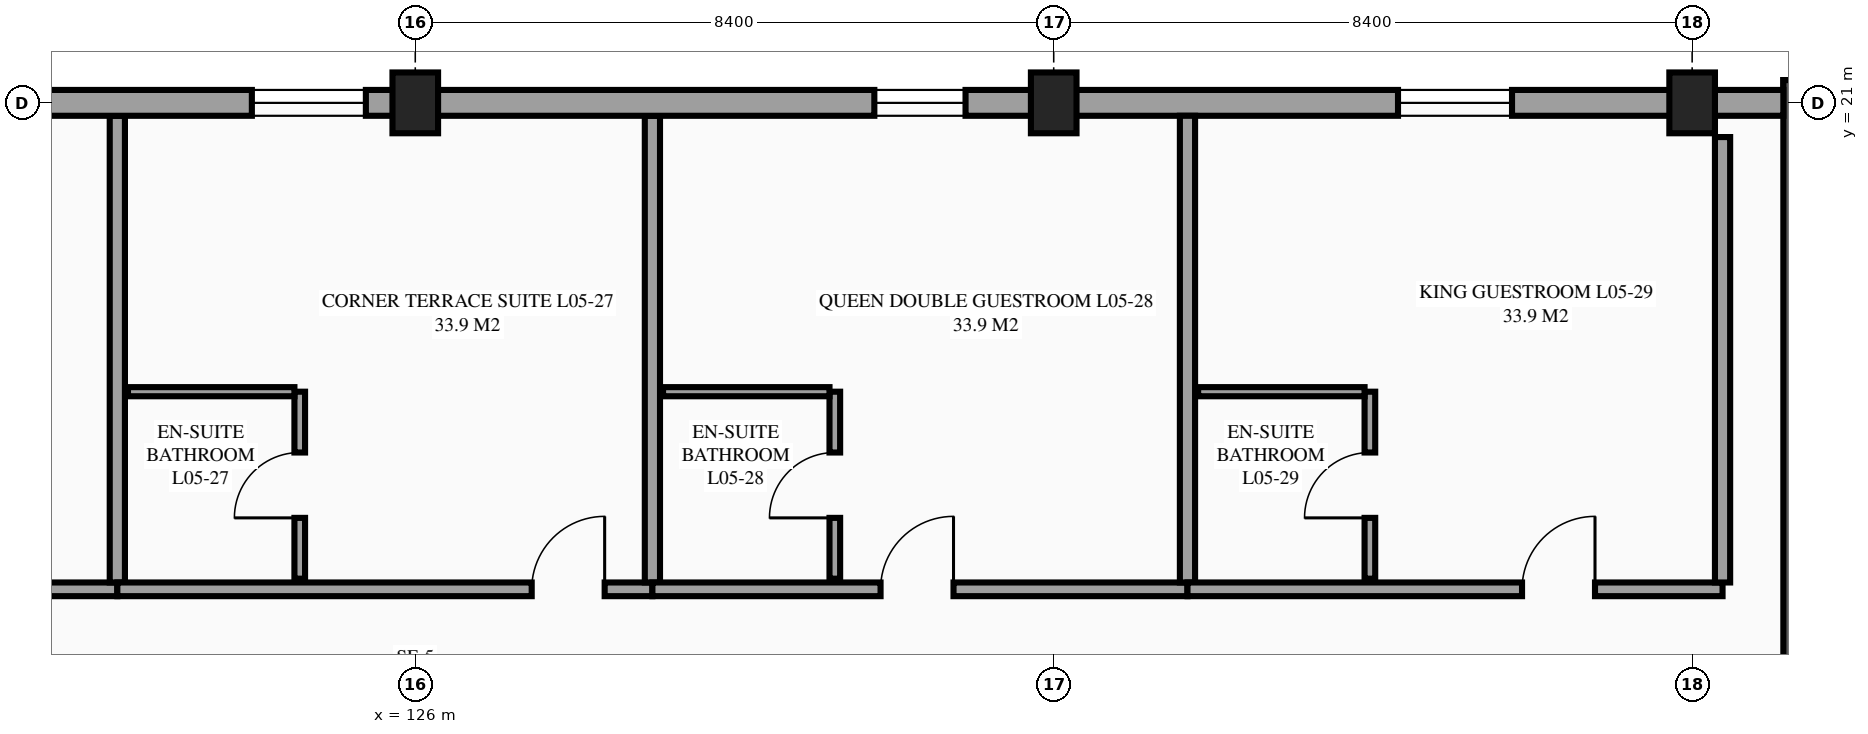
"""IFC4 building model, lengths in metres.
Left out: names, types, materials, properties, quantities, classifications, styles, units other than length and angle.
Written with IfcOpenShell. Run it as: python <this file> out.ifc"""

import sys

from ifc_helpers import new_model, si_unit, direction, frame, frame_2d, origin, origin_2d, place, context, subcontext, project, spatial, rectangle, extrude, element, fill, save


model = new_model("IFC4")
c1 = context("Model", 3, precision=1e-05, world=origin(), true_north=direction((0.0, 1.0)))
c2 = subcontext(c1, "Body", "Model", "MODEL_VIEW")
j1 = project(units=[si_unit("LENGTHUNIT", "METRE"), si_unit("PLANEANGLEUNIT", "RADIAN")], contexts=[c1])
p1 = place(None, origin())
s1 = spatial("IfcSite", under=j1, at=p1, CompositionType="ELEMENT")
p2 = place(p1, origin())
s2 = spatial("IfcBuilding", under=s1, at=p2, CompositionType="ELEMENT")
p3 = place(p2, frame((0.0, 0.0, 21.9)))
s3 = spatial("IfcBuildingStorey", under=s2, at=p3, CompositionType="ELEMENT", Elevation=21.9)
for number, where, z_axis, x_axis in (
    (1, (126.0, 21.0, 0.0), (0.0, 0.0, 1.0), (1.0, 0.0, 0.0)),
    (2, (134.4, 21.0, 0.0), (0.0, 0.0, 1.0), (1.0, 0.0, 0.0)),
    (3, (142.8, 21.0, 0.0), (0.0, 0.0, 1.0), (1.0, 0.0, 0.0)),
):
    element("IfcColumn", number, at=place(p3, frame(where, z_axis=z_axis, x_axis=x_axis)), inside=s3, PredefinedType="COLUMN", context=c2, shape_type="SweptSolid", body=[
        extrude(rectangle(XDim=0.6, YDim=0.8, at=origin_2d()), origin(), (0.0, 0.0, 1.0), 3.6),
    ])
p4 = place(p3, frame((142.8, 21.0, 0.0), z_axis=(0.0, 0.0, 1.0), x_axis=(-1.0, 0.0, 0.0)))
e4 = element("IfcWall", 4, at=p4, inside=s3, PredefinedType="STANDARD", context=c2, shape_type="SweptSolid", body=[
    extrude(rectangle(XDim=8.4, YDim=0.34, at=frame_2d((4.2, 0.0))), origin(), (0.0, 0.0, 1.0), 3.07),
])
p5 = place(p4, frame((2.37, 0.0, 0.85)))
e5 = element("IfcOpeningElement", 5, at=p5, cuts=e4, PredefinedType="OPENING", context=c2, shape_type="SweptSolid", body=[
    extrude(rectangle(XDim=1.5, YDim=1.5, at=frame_2d((0.75, 0.75))), frame((0.0, 0.18, 0.0), z_axis=(0.0, -1.0, 0.0), x_axis=(1.0, 0.0, 0.0)), (0.0, 0.0, 1.0), 0.36),
])
p6 = place(p3, frame((149.2, 21.15, 0.0), z_axis=(0.0, 0.0, 1.0), x_axis=(-1.0, 0.0, 0.0)))
e6 = element("IfcWall", 6, at=p6, inside=s3, PredefinedType="SHEAR", context=c2, shape_type="SweptSolid", body=[
    extrude(rectangle(XDim=5.2, YDim=0.3, at=frame_2d((2.6, 0.0))), origin(), (0.0, 0.0, 1.0), 3.6),
])
p7 = place(p3, frame((144.15, 21.3, 0.0), z_axis=(0.0, 0.0, 1.0), x_axis=(0.0, -1.0, 0.0)))
e7 = element("IfcWall", 7, at=p7, inside=s3, PredefinedType="SHEAR", context=c2, shape_type="SweptSolid", body=[
    extrude(rectangle(XDim=8.84, YDim=0.3, at=frame_2d((4.42, 0.0))), origin(), (0.0, 0.0, 1.0), 3.6),
])
p8 = place(p3, frame((115.04, 14.6, 0.0), z_axis=(0.0, 0.0, 1.0), x_axis=(1.0, 0.0, 0.0)))
e8 = element("IfcWall", 8, at=p8, inside=s3, PredefinedType="PARTITIONING", context=c2, shape_type="SweptSolid", body=[
    extrude(rectangle(XDim=7.04, YDim=0.18, at=frame_2d((3.52, 0.0))), origin(), (0.0, 0.0, 1.0), 3.375),
])
p9 = place(p8, frame((4.752, 0.0, 0.0)))
e9 = element("IfcOpeningElement", 9, at=p9, cuts=e8, PredefinedType="OPENING", context=c2, shape_type="SweptSolid", body=[
    extrude(rectangle(XDim=0.96, YDim=2.15, at=frame_2d((0.48, 1.075))), frame((0.0, 0.1, 0.0), z_axis=(0.0, -1.0, 0.0), x_axis=(1.0, 0.0, 0.0)), (0.0, 0.0, 1.0), 0.2),
])
p10 = place(p3, frame((122.08, 14.69, 0.0), z_axis=(0.0, 0.0, 1.0), x_axis=(0.0, 1.0, 0.0)))
e10 = element("IfcWall", 10, at=p10, inside=s3, PredefinedType="PARTITIONING", context=c2, shape_type="SweptSolid", body=[
    extrude(rectangle(XDim=6.14, YDim=0.2, at=frame_2d((3.07, 0.0))), origin(), (0.0, 0.0, 1.0), 3.375),
])
p11 = place(p3, frame((122.08, 14.6, 0.0), z_axis=(0.0, 0.0, 1.0), x_axis=(1.0, 0.0, 0.0)))
e11 = element("IfcWall", 11, at=p11, inside=s3, PredefinedType="PARTITIONING", context=c2, shape_type="SweptSolid", body=[
    extrude(rectangle(XDim=7.04, YDim=0.18, at=frame_2d((3.52, 0.0))), origin(), (0.0, 0.0, 1.0), 3.375),
])
p12 = place(p11, frame((5.452, 0.0, 0.0)))
e12 = element("IfcOpeningElement", 12, at=p12, cuts=e11, PredefinedType="OPENING", context=c2, shape_type="SweptSolid", body=[
    extrude(rectangle(XDim=0.96, YDim=2.15, at=frame_2d((0.48, 1.075))), frame((0.0, 0.1, 0.0), z_axis=(0.0, -1.0, 0.0), x_axis=(1.0, 0.0, 0.0)), (0.0, 0.0, 1.0), 0.2),
])
p13 = place(p3, frame((129.12, 14.69, 0.0), z_axis=(0.0, 0.0, 1.0), x_axis=(0.0, 1.0, 0.0)))
e13 = element("IfcWall", 13, at=p13, inside=s3, PredefinedType="PARTITIONING", context=c2, shape_type="SweptSolid", body=[
    extrude(rectangle(XDim=6.14, YDim=0.2, at=frame_2d((3.07, 0.0))), origin(), (0.0, 0.0, 1.0), 3.375),
])
p14 = place(p3, frame((124.48, 14.74, 0.0), z_axis=(0.0, 0.0, 1.0), x_axis=(0.0, 1.0, 0.0)))
e14 = element("IfcWall", 14, at=p14, inside=s3, PredefinedType="PARTITIONING", context=c2, shape_type="SweptSolid", body=[
    extrude(rectangle(XDim=2.46, YDim=0.14, at=frame_2d((1.23, 0.0))), origin(), (0.0, 0.0, 1.0), 3.375),
])
p15 = place(p14, frame((0.8, 0.0, 0.0)))
e15 = element("IfcOpeningElement", 15, at=p15, cuts=e14, PredefinedType="OPENING", context=c2, shape_type="SweptSolid", body=[
    extrude(rectangle(XDim=0.86, YDim=2.1, at=frame_2d((0.43, 1.05))), frame((0.0, 0.08, 0.0), z_axis=(0.0, -1.0, 0.0), x_axis=(1.0, 0.0, 0.0)), (0.0, 0.0, 1.0), 0.16),
])
p16 = place(p3, frame((122.22, 17.2, 0.0), z_axis=(0.0, 0.0, 1.0), x_axis=(1.0, 0.0, 0.0)))
e16 = element("IfcWall", 16, at=p16, inside=s3, PredefinedType="PARTITIONING", context=c2, shape_type="SweptSolid", body=[
    extrude(rectangle(XDim=2.19, YDim=0.12, at=frame_2d((1.095, 0.0))), origin(), (0.0, 0.0, 1.0), 3.375),
])
p17 = place(p3, frame((129.12, 14.6, 0.0), z_axis=(0.0, 0.0, 1.0), x_axis=(1.0, 0.0, 0.0)))
e17 = element("IfcWall", 17, at=p17, inside=s3, PredefinedType="PARTITIONING", context=c2, shape_type="SweptSolid", body=[
    extrude(rectangle(XDim=7.04, YDim=0.18, at=frame_2d((3.52, 0.0))), origin(), (0.0, 0.0, 1.0), 3.375),
])
p18 = place(p17, frame((3.002, 0.0, 0.0)))
e18 = element("IfcOpeningElement", 18, at=p18, cuts=e17, PredefinedType="OPENING", context=c2, shape_type="SweptSolid", body=[
    extrude(rectangle(XDim=0.96, YDim=2.15, at=frame_2d((0.48, 1.075))), frame((0.0, 0.1, 0.0), z_axis=(0.0, -1.0, 0.0), x_axis=(1.0, 0.0, 0.0)), (0.0, 0.0, 1.0), 0.2),
])
p19 = place(p3, frame((136.16, 14.69, 0.0), z_axis=(0.0, 0.0, 1.0), x_axis=(0.0, 1.0, 0.0)))
e19 = element("IfcWall", 19, at=p19, inside=s3, PredefinedType="PARTITIONING", context=c2, shape_type="SweptSolid", body=[
    extrude(rectangle(XDim=6.14, YDim=0.2, at=frame_2d((3.07, 0.0))), origin(), (0.0, 0.0, 1.0), 3.375),
])
p20 = place(p3, frame((131.52, 14.74, 0.0), z_axis=(0.0, 0.0, 1.0), x_axis=(0.0, 1.0, 0.0)))
e20 = element("IfcWall", 20, at=p20, inside=s3, PredefinedType="PARTITIONING", context=c2, shape_type="SweptSolid", body=[
    extrude(rectangle(XDim=2.46, YDim=0.14, at=frame_2d((1.23, 0.0))), origin(), (0.0, 0.0, 1.0), 3.375),
])
p21 = place(p20, frame((0.8, 0.0, 0.0)))
e21 = element("IfcOpeningElement", 21, at=p21, cuts=e20, PredefinedType="OPENING", context=c2, shape_type="SweptSolid", body=[
    extrude(rectangle(XDim=0.86, YDim=2.1, at=frame_2d((0.43, 1.05))), frame((0.0, 0.08, 0.0), z_axis=(0.0, -1.0, 0.0), x_axis=(1.0, 0.0, 0.0)), (0.0, 0.0, 1.0), 0.16),
])
p22 = place(p3, frame((129.26, 17.2, 0.0), z_axis=(0.0, 0.0, 1.0), x_axis=(1.0, 0.0, 0.0)))
e22 = element("IfcWall", 22, at=p22, inside=s3, PredefinedType="PARTITIONING", context=c2, shape_type="SweptSolid", body=[
    extrude(rectangle(XDim=2.19, YDim=0.12, at=frame_2d((1.095, 0.0))), origin(), (0.0, 0.0, 1.0), 3.375),
])
p23 = place(p3, frame((136.16, 14.6, 0.0), z_axis=(0.0, 0.0, 1.0), x_axis=(1.0, 0.0, 0.0)))
e23 = element("IfcWall", 23, at=p23, inside=s3, PredefinedType="PARTITIONING", context=c2, shape_type="SweptSolid", body=[
    extrude(rectangle(XDim=7.04, YDim=0.18, at=frame_2d((3.52, 0.0))), origin(), (0.0, 0.0, 1.0), 3.375),
])
p24 = place(p23, frame((4.402, 0.0, 0.0)))
e24 = element("IfcOpeningElement", 24, at=p24, cuts=e23, PredefinedType="OPENING", context=c2, shape_type="SweptSolid", body=[
    extrude(rectangle(XDim=0.96, YDim=2.15, at=frame_2d((0.48, 1.075))), frame((0.0, 0.1, 0.0), z_axis=(0.0, -1.0, 0.0), x_axis=(1.0, 0.0, 0.0)), (0.0, 0.0, 1.0), 0.2),
])
p25 = place(p3, frame((143.2, 14.69, 0.0), z_axis=(0.0, 0.0, 1.0), x_axis=(0.0, 1.0, 0.0)))
e25 = element("IfcWall", 25, at=p25, inside=s3, PredefinedType="PARTITIONING", context=c2, shape_type="SweptSolid", body=[
    extrude(rectangle(XDim=5.86, YDim=0.2, at=frame_2d((2.93, 0.0))), origin(), (0.0, 0.0, 1.0), 3.375),
])
p26 = place(p3, frame((138.56, 14.74, 0.0), z_axis=(0.0, 0.0, 1.0), x_axis=(0.0, 1.0, 0.0)))
e26 = element("IfcWall", 26, at=p26, inside=s3, PredefinedType="PARTITIONING", context=c2, shape_type="SweptSolid", body=[
    extrude(rectangle(XDim=2.46, YDim=0.14, at=frame_2d((1.23, 0.0))), origin(), (0.0, 0.0, 1.0), 3.375),
])
p27 = place(p26, frame((0.8, 0.0, 0.0)))
e27 = element("IfcOpeningElement", 27, at=p27, cuts=e26, PredefinedType="OPENING", context=c2, shape_type="SweptSolid", body=[
    extrude(rectangle(XDim=0.86, YDim=2.1, at=frame_2d((0.43, 1.05))), frame((0.0, 0.08, 0.0), z_axis=(0.0, -1.0, 0.0), x_axis=(1.0, 0.0, 0.0)), (0.0, 0.0, 1.0), 0.16),
])
p28 = place(p3, frame((136.3, 17.2, 0.0), z_axis=(0.0, 0.0, 1.0), x_axis=(1.0, 0.0, 0.0)))
e28 = element("IfcWall", 28, at=p28, inside=s3, PredefinedType="PARTITIONING", context=c2, shape_type="SweptSolid", body=[
    extrude(rectangle(XDim=2.19, YDim=0.12, at=frame_2d((1.095, 0.0))), origin(), (0.0, 0.0, 1.0), 3.375),
])
p29 = place(p3, frame((144.0, 21.0, 0.0), z_axis=(0.0, 0.0, 1.0), x_axis=(-1.0, 0.0, 0.0)))
e29 = element("IfcWall", 29, at=p29, inside=s3, PredefinedType="STANDARD", context=c2, shape_type="SweptSolid", body=[
    extrude(rectangle(XDim=1.2, YDim=0.34, at=frame_2d((0.6, 0.0))), origin(), (0.0, 0.0, 1.0), 2.73),
])
p30 = place(p3, frame((134.4, 21.0, 0.0), z_axis=(0.0, 0.0, 1.0), x_axis=(-1.0, 0.0, 0.0)))
e30 = element("IfcWall", 30, at=p30, inside=s3, PredefinedType="STANDARD", context=c2, shape_type="SweptSolid", body=[
    extrude(rectangle(XDim=8.4, YDim=0.34, at=frame_2d((4.2, 0.0))), origin(), (0.0, 0.0, 1.0), 2.63),
])
p31 = place(p30, frame((1.16, 0.0, 0.85)))
e31 = element("IfcOpeningElement", 31, at=p31, cuts=e30, PredefinedType="OPENING", context=c2, shape_type="SweptSolid", body=[
    extrude(rectangle(XDim=1.2, YDim=1.5, at=frame_2d((0.6, 0.75))), frame((0.0, 0.18, 0.0), z_axis=(0.0, -1.0, 0.0), x_axis=(1.0, 0.0, 0.0)), (0.0, 0.0, 1.0), 0.36),
])
p32 = place(p3, frame((126.0, 21.0, 0.0), z_axis=(0.0, 0.0, 1.0), x_axis=(-1.0, 0.0, 0.0)))
e32 = element("IfcWall", 32, at=p32, inside=s3, PredefinedType="STANDARD", context=c2, shape_type="SweptSolid", body=[
    extrude(rectangle(XDim=8.4, YDim=0.34, at=frame_2d((4.2, 0.0))), origin(), (0.0, 0.0, 1.0), 2.53),
])
p33 = place(p32, frame((6.19, 0.0, 0.85)))
e33 = element("IfcOpeningElement", 33, at=p33, cuts=e32, PredefinedType="OPENING", context=c2, shape_type="SweptSolid", body=[
    extrude(rectangle(XDim=1.5, YDim=1.5, at=frame_2d((0.75, 0.75))), frame((0.0, 0.18, 0.0), z_axis=(0.0, -1.0, 0.0), x_axis=(1.0, 0.0, 0.0)), (0.0, 0.0, 1.0), 0.36),
])
p34 = place(p32, frame((0.65, 0.0, 0.85)))
e34 = element("IfcOpeningElement", 34, at=p34, cuts=e32, PredefinedType="OPENING", context=c2, shape_type="SweptSolid", body=[
    extrude(rectangle(XDim=1.5, YDim=1.5, at=frame_2d((0.75, 0.75))), frame((0.0, 0.18, 0.0), z_axis=(0.0, -1.0, 0.0), x_axis=(1.0, 0.0, 0.0)), (0.0, 0.0, 1.0), 0.36),
])
p35 = place(p34, origin())
e35 = element("IfcWindow", 35, at=p35, inside=s3, PartitioningType="SINGLE_PANEL", PredefinedType="WINDOW", context=c2, shape_type="SweptSolid", body=[
    extrude(rectangle(XDim=1.5, YDim=1.5, at=frame_2d((0.75, 0.75))), frame((0.0, 0.03, 0.0), z_axis=(0.0, -1.0, 0.0), x_axis=(1.0, 0.0, 0.0)), (0.0, 0.0, 1.0), 0.06),
])
fill(e34, e35)
p36 = place(p31, origin())
e36 = element("IfcWindow", 36, at=p36, inside=s3, PartitioningType="SINGLE_PANEL", PredefinedType="WINDOW", context=c2, shape_type="SweptSolid", body=[
    extrude(rectangle(XDim=1.2, YDim=1.5, at=frame_2d((0.6, 0.75))), frame((0.0, 0.03, 0.0), z_axis=(0.0, -1.0, 0.0), x_axis=(1.0, 0.0, 0.0)), (0.0, 0.0, 1.0), 0.06),
])
fill(e31, e36)
p37 = place(p5, origin())
e37 = element("IfcWindow", 37, at=p37, inside=s3, PartitioningType="SINGLE_PANEL", PredefinedType="WINDOW", context=c2, shape_type="SweptSolid", body=[
    extrude(rectangle(XDim=1.5, YDim=1.5, at=frame_2d((0.75, 0.75))), frame((0.0, 0.03, 0.0), z_axis=(0.0, -1.0, 0.0), x_axis=(1.0, 0.0, 0.0)), (0.0, 0.0, 1.0), 0.06),
])
fill(e5, e37)
p38 = place(p12, origin())
e38 = element("IfcDoor", 38, at=p38, inside=s3, OperationType="SINGLE_SWING_RIGHT", PredefinedType="DOOR", context=c2, shape_type="SweptSolid", body=[
    extrude(rectangle(XDim=0.96, YDim=2.15, at=frame_2d((0.48, 1.075))), frame((0.0, 0.025, 0.0), z_axis=(0.0, -1.0, 0.0), x_axis=(1.0, 0.0, 0.0)), (0.0, 0.0, 1.0), 0.05),
])
fill(e12, e38)
p39 = place(p15, origin())
e39 = element("IfcDoor", 39, at=p39, inside=s3, OperationType="SINGLE_SWING_LEFT", PredefinedType="DOOR", context=c2, shape_type="SweptSolid", body=[
    extrude(rectangle(XDim=0.86, YDim=2.1, at=frame_2d((0.43, 1.05))), frame((0.0, 0.025, 0.0), z_axis=(0.0, -1.0, 0.0), x_axis=(1.0, 0.0, 0.0)), (0.0, 0.0, 1.0), 0.05),
])
fill(e15, e39)
p40 = place(p18, origin())
e40 = element("IfcDoor", 40, at=p40, inside=s3, OperationType="SINGLE_SWING_RIGHT", PredefinedType="DOOR", context=c2, shape_type="SweptSolid", body=[
    extrude(rectangle(XDim=0.96, YDim=2.15, at=frame_2d((0.48, 1.075))), frame((0.0, 0.025, 0.0), z_axis=(0.0, -1.0, 0.0), x_axis=(1.0, 0.0, 0.0)), (0.0, 0.0, 1.0), 0.05),
])
fill(e18, e40)
p41 = place(p21, origin())
e41 = element("IfcDoor", 41, at=p41, inside=s3, OperationType="SINGLE_SWING_LEFT", PredefinedType="DOOR", context=c2, shape_type="SweptSolid", body=[
    extrude(rectangle(XDim=0.86, YDim=2.1, at=frame_2d((0.43, 1.05))), frame((0.0, 0.025, 0.0), z_axis=(0.0, -1.0, 0.0), x_axis=(1.0, 0.0, 0.0)), (0.0, 0.0, 1.0), 0.05),
])
fill(e21, e41)
p42 = place(p24, origin())
e42 = element("IfcDoor", 42, at=p42, inside=s3, OperationType="SINGLE_SWING_RIGHT", PredefinedType="DOOR", context=c2, shape_type="SweptSolid", body=[
    extrude(rectangle(XDim=0.96, YDim=2.15, at=frame_2d((0.48, 1.075))), frame((0.0, 0.025, 0.0), z_axis=(0.0, -1.0, 0.0), x_axis=(1.0, 0.0, 0.0)), (0.0, 0.0, 1.0), 0.05),
])
fill(e24, e42)
p43 = place(p27, origin())
e43 = element("IfcDoor", 43, at=p43, inside=s3, OperationType="SINGLE_SWING_LEFT", PredefinedType="DOOR", context=c2, shape_type="SweptSolid", body=[
    extrude(rectangle(XDim=0.86, YDim=2.1, at=frame_2d((0.43, 1.05))), frame((0.0, 0.025, 0.0), z_axis=(0.0, -1.0, 0.0), x_axis=(1.0, 0.0, 0.0)), (0.0, 0.0, 1.0), 0.05),
])
fill(e27, e43)
save(model, sys.argv[1])
